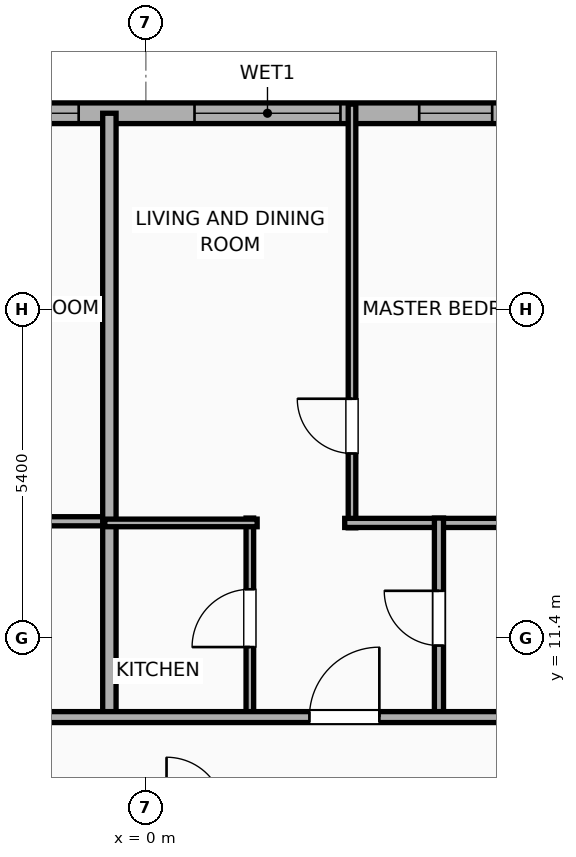
"""IFC4 building model, lengths in metres.
Left out: names, types, materials, properties, quantities, classifications, styles, units other than length and angle.
Written with IfcOpenShell. Run it as: python <this file> out.ifc"""

import sys

from ifc_helpers import new_model, si_unit, direction, frame, frame_2d, origin, place, context, subcontext, project, spatial, rectangle, extrude, element, fill, save


model = new_model("IFC4")
c1 = context("Model", 3, precision=1e-05, world=origin(), true_north=direction((0.0, 1.0)))
c2 = subcontext(c1, "Body", "Model", "MODEL_VIEW")
j1 = project(units=[si_unit("LENGTHUNIT", "METRE"), si_unit("PLANEANGLEUNIT", "RADIAN")], contexts=[c1])
p1 = place(None, origin())
s1 = spatial("IfcSite", under=j1, at=p1, CompositionType="ELEMENT")
p2 = place(p1, origin())
s2 = spatial("IfcBuilding", under=s1, at=p2, CompositionType="ELEMENT")
p3 = place(p2, frame((0.0, 0.0, 235.3)))
s3 = spatial("IfcBuildingStorey", under=s2, at=p3, CompositionType="ELEMENT", Elevation=235.3)
p4 = place(p3, frame((-22.783, 20.03, 0.0), z_axis=(0.0, 0.0, 1.0), x_axis=(1.0, 0.0, 0.0)))
e1 = element("IfcWall", 1, at=p4, inside=s3, PredefinedType="ELEMENTEDWALL", context=c2, shape_type="SweptSolid", body=[
    extrude(rectangle(XDim=49.566, YDim=0.34, at=frame_2d((24.783, 0.0))), origin(), (0.0, 0.0, 1.0), 3.65),
])
p5 = place(p4, frame((23.583, 0.0, 0.75)))
e2 = element("IfcOpeningElement", 2, at=p5, cuts=e1, PredefinedType="OPENING", context=c2, shape_type="SweptSolid", body=[
    extrude(rectangle(XDim=2.4, YDim=2.1, at=frame_2d((1.2, 1.05))), frame((0.0, 0.18, 0.0), z_axis=(0.0, -1.0, 0.0), x_axis=(1.0, 0.0, 0.0)), (0.0, 0.0, 1.0), 0.36),
])
p6 = place(p4, frame((40.956, 0.0, 0.75)))
e3 = element("IfcOpeningElement", 3, at=p6, cuts=e1, PredefinedType="OPENING", context=c2, shape_type="SweptSolid", body=[
    extrude(rectangle(XDim=2.4, YDim=2.1, at=frame_2d((1.2, 1.05))), frame((0.0, 0.18, 0.0), z_axis=(0.0, -1.0, 0.0), x_axis=(1.0, 0.0, 0.0)), (0.0, 0.0, 1.0), 0.36),
])
p7 = place(p4, frame((5.078, 0.0, 0.75)))
e4 = element("IfcOpeningElement", 4, at=p7, cuts=e1, PredefinedType="OPENING", context=c2, shape_type="SweptSolid", body=[
    extrude(rectangle(XDim=1.2, YDim=2.05, at=frame_2d((0.6, 1.025))), frame((0.0, 0.18, 0.0), z_axis=(0.0, -1.0, 0.0), x_axis=(1.0, 0.0, 0.0)), (0.0, 0.0, 1.0), 0.36),
])
p8 = place(p4, frame((8.058, 0.0, 0.75)))
e5 = element("IfcOpeningElement", 5, at=p8, cuts=e1, PredefinedType="OPENING", context=c2, shape_type="SweptSolid", body=[
    extrude(rectangle(XDim=1.2, YDim=2.05, at=frame_2d((0.6, 1.025))), frame((0.0, 0.18, 0.0), z_axis=(0.0, -1.0, 0.0), x_axis=(1.0, 0.0, 0.0)), (0.0, 0.0, 1.0), 0.36),
])
p9 = place(p4, frame((12.478, 0.0, 0.75)))
e6 = element("IfcOpeningElement", 6, at=p9, cuts=e1, PredefinedType="OPENING", context=c2, shape_type="SweptSolid", body=[
    extrude(rectangle(XDim=1.2, YDim=2.05, at=frame_2d((0.6, 1.025))), frame((0.0, 0.18, 0.0), z_axis=(0.0, -1.0, 0.0), x_axis=(1.0, 0.0, 0.0)), (0.0, 0.0, 1.0), 0.36),
])
p10 = place(p4, frame((16.178, 0.0, 0.75)))
e7 = element("IfcOpeningElement", 7, at=p10, cuts=e1, PredefinedType="OPENING", context=c2, shape_type="SweptSolid", body=[
    extrude(rectangle(XDim=1.2, YDim=2.05, at=frame_2d((0.6, 1.025))), frame((0.0, 0.18, 0.0), z_axis=(0.0, -1.0, 0.0), x_axis=(1.0, 0.0, 0.0)), (0.0, 0.0, 1.0), 0.36),
])
p11 = place(p4, frame((20.478, 0.0, 0.75)))
e8 = element("IfcOpeningElement", 8, at=p11, cuts=e1, PredefinedType="OPENING", context=c2, shape_type="SweptSolid", body=[
    extrude(rectangle(XDim=1.2, YDim=2.05, at=frame_2d((0.6, 1.025))), frame((0.0, 0.18, 0.0), z_axis=(0.0, -1.0, 0.0), x_axis=(1.0, 0.0, 0.0)), (0.0, 0.0, 1.0), 0.36),
])
p12 = place(p4, frame((27.278, 0.0, 0.75)))
e9 = element("IfcOpeningElement", 9, at=p12, cuts=e1, PredefinedType="OPENING", context=c2, shape_type="SweptSolid", body=[
    extrude(rectangle(XDim=1.2, YDim=2.05, at=frame_2d((0.6, 1.025))), frame((0.0, 0.18, 0.0), z_axis=(0.0, -1.0, 0.0), x_axis=(1.0, 0.0, 0.0)), (0.0, 0.0, 1.0), 0.36),
])
p13 = place(p4, frame((30.978, 0.0, 0.75)))
e10 = element("IfcOpeningElement", 10, at=p13, cuts=e1, PredefinedType="OPENING", context=c2, shape_type="SweptSolid", body=[
    extrude(rectangle(XDim=1.2, YDim=2.05, at=frame_2d((0.6, 1.025))), frame((0.0, 0.18, 0.0), z_axis=(0.0, -1.0, 0.0), x_axis=(1.0, 0.0, 0.0)), (0.0, 0.0, 1.0), 0.36),
])
p14 = place(p4, frame((34.678, 0.0, 0.75)))
e11 = element("IfcOpeningElement", 11, at=p14, cuts=e1, PredefinedType="OPENING", context=c2, shape_type="SweptSolid", body=[
    extrude(rectangle(XDim=1.2, YDim=2.05, at=frame_2d((0.6, 1.025))), frame((0.0, 0.18, 0.0), z_axis=(0.0, -1.0, 0.0), x_axis=(1.0, 0.0, 0.0)), (0.0, 0.0, 1.0), 0.36),
])
p15 = place(p4, frame((37.798, 0.0, 0.75)))
e12 = element("IfcOpeningElement", 12, at=p15, cuts=e1, PredefinedType="OPENING", context=c2, shape_type="SweptSolid", body=[
    extrude(rectangle(XDim=1.2, YDim=2.05, at=frame_2d((0.6, 1.025))), frame((0.0, 0.18, 0.0), z_axis=(0.0, -1.0, 0.0), x_axis=(1.0, 0.0, 0.0)), (0.0, 0.0, 1.0), 0.36),
])
p16 = place(p4, frame((45.83, 0.0, 0.75)))
e13 = element("IfcOpeningElement", 13, at=p16, cuts=e1, PredefinedType="OPENING", context=c2, shape_type="SweptSolid", body=[
    extrude(rectangle(XDim=1.2, YDim=2.05, at=frame_2d((0.6, 1.025))), frame((0.0, 0.18, 0.0), z_axis=(0.0, -1.0, 0.0), x_axis=(1.0, 0.0, 0.0)), (0.0, 0.0, 1.0), 0.36),
])
p17 = place(p3, frame((-4.13, 13.32, 0.0), z_axis=(0.0, 0.0, 1.0), x_axis=(1.0, 0.0, 0.0)))
e14 = element("IfcWall", 14, at=p17, inside=s3, PredefinedType="PLUMBINGWALL", context=c2, shape_type="SweptSolid", body=[
    extrude(rectangle(XDim=3.605, YDim=0.15, at=frame_2d((1.802, 0.0))), origin(), (0.0, 0.0, 1.0), 3.65),
])
p18 = place(p3, frame((-0.6, 10.02, 0.0), z_axis=(0.0, 0.0, 1.0), x_axis=(0.0, 1.0, 0.0)))
e15 = element("IfcWall", 15, at=p18, inside=s3, PredefinedType="PARTITIONING", context=c2, shape_type="SweptSolid", body=[
    extrude(rectangle(XDim=10.01, YDim=0.22, at=frame_2d((5.005, 0.0))), origin(), (0.0, 0.0, 1.0), 3.65),
])
p19 = place(p3, frame((3.39, 13.213, 0.0), z_axis=(0.0, 0.0, 1.0), x_axis=(0.0, 1.0, 0.0)))
e16 = element("IfcWall", 16, at=p19, inside=s3, PredefinedType="PARTITIONING", context=c2, shape_type="SweptSolid", body=[
    extrude(rectangle(XDim=6.967, YDim=0.125, at=frame_2d((3.483, 0.0))), origin(), (0.0, 0.0, 1.0), 3.65),
])
p20 = place(p19, frame((1.222, 0.0, 0.0)))
e17 = element("IfcOpeningElement", 17, at=p20, cuts=e16, PredefinedType="OPENING", context=c2, shape_type="SweptSolid", body=[
    extrude(rectangle(XDim=0.9, YDim=2.05, at=frame_2d((0.45, 1.025))), frame((0.0, 0.073, 0.0), z_axis=(0.0, -1.0, 0.0), x_axis=(1.0, 0.0, 0.0)), (0.0, 0.0, 1.0), 0.145),
])
p21 = place(p3, frame((3.27, 13.293, 0.0), z_axis=(0.0, 0.0, 1.0), x_axis=(1.0, 0.0, 0.0)))
e18 = element("IfcWall", 18, at=p21, inside=s3, PredefinedType="PLUMBINGWALL", context=c2, shape_type="SweptSolid", body=[
    extrude(rectangle(XDim=3.79, YDim=0.15, at=frame_2d((1.895, 0.0))), origin(), (0.0, 0.0, 1.0), 3.65),
])
p22 = place(p3, frame((1.71, 10.08, 0.0), z_axis=(0.0, 0.0, 1.0), x_axis=(0.0, 1.0, 0.0)))
e19 = element("IfcWall", 19, at=p22, inside=s3, PredefinedType="PARTITIONING", context=c2, shape_type="SweptSolid", body=[
    extrude(rectangle(XDim=3.293, YDim=0.125, at=frame_2d((1.646, 0.0))), origin(), (0.0, 0.0, 1.0), 3.65),
])
p23 = place(p22, frame((1.171, 0.0, 0.0)))
e20 = element("IfcOpeningElement", 20, at=p23, cuts=e19, PredefinedType="OPENING", context=c2, shape_type="SweptSolid", body=[
    extrude(rectangle(XDim=0.95, YDim=2.05, at=frame_2d((0.475, 1.025))), frame((0.0, 0.073, 0.0), z_axis=(0.0, -1.0, 0.0), x_axis=(1.0, 0.0, 0.0)), (0.0, 0.0, 1.0), 0.145),
])
p24 = place(p3, frame((-0.675, 13.293, 0.0), z_axis=(0.0, 0.0, 1.0), x_axis=(1.0, 0.0, 0.0)))
e21 = element("IfcWall", 21, at=p24, inside=s3, PredefinedType="PARTITIONING", context=c2, shape_type="SweptSolid", body=[
    extrude(rectangle(XDim=2.505, YDim=0.125, at=frame_2d((1.252, 0.0))), origin(), (0.0, 0.0, 1.0), 3.65),
])
p25 = place(p3, frame((4.82, 10.08, 0.0), z_axis=(0.0, 0.0, 1.0), x_axis=(0.0, 1.0, 0.0)))
e22 = element("IfcWall", 22, at=p25, inside=s3, PredefinedType="PLUMBINGWALL", context=c2, shape_type="SweptSolid", body=[
    extrude(rectangle(XDim=3.293, YDim=0.15, at=frame_2d((1.646, 0.0))), origin(), (0.0, 0.0, 1.0), 3.09),
])
p26 = place(p25, frame((1.197, 0.0, 0.0)))
e23 = element("IfcOpeningElement", 23, at=p26, cuts=e22, PredefinedType="OPENING", context=c2, shape_type="SweptSolid", body=[
    extrude(rectangle(XDim=0.9, YDim=2.05, at=frame_2d((0.45, 1.025))), frame((0.0, 0.085, 0.0), z_axis=(0.0, -1.0, 0.0), x_axis=(1.0, 0.0, 0.0)), (0.0, 0.0, 1.0), 0.17),
])
p27 = place(p3, frame((-26.23, 10.1, 0.0), z_axis=(0.0, 0.0, 1.0), x_axis=(1.0, 0.0, 0.0)))
e24 = element("IfcWall", 24, at=p27, inside=s3, PredefinedType="PARTITIONING", context=c2, shape_type="SweptSolid", body=[
    extrude(rectangle(XDim=56.46, YDim=0.18, at=frame_2d((28.23, 0.0))), origin(), (0.0, 0.0, 1.0), 3.65),
])
p28 = place(p27, frame((5.302, 0.0, 0.0)))
e25 = element("IfcOpeningElement", 25, at=p28, cuts=e24, PredefinedType="OPENING", context=c2, shape_type="SweptSolid", body=[
    extrude(rectangle(XDim=1.15, YDim=2.05, at=frame_2d((0.575, 1.025))), frame((0.0, 0.1, 0.0), z_axis=(0.0, -1.0, 0.0), x_axis=(1.0, 0.0, 0.0)), (0.0, 0.0, 1.0), 0.2),
])
p29 = place(p27, frame((14.122, 0.0, 0.0)))
e26 = element("IfcOpeningElement", 26, at=p29, cuts=e24, PredefinedType="OPENING", context=c2, shape_type="SweptSolid", body=[
    extrude(rectangle(XDim=1.15, YDim=2.05, at=frame_2d((0.575, 1.025))), frame((0.0, 0.1, 0.0), z_axis=(0.0, -1.0, 0.0), x_axis=(1.0, 0.0, 0.0)), (0.0, 0.0, 1.0), 0.2),
])
p30 = place(p27, frame((21.518, 0.0, 0.0)))
e27 = element("IfcOpeningElement", 27, at=p30, cuts=e24, PredefinedType="OPENING", context=c2, shape_type="SweptSolid", body=[
    extrude(rectangle(XDim=1.15, YDim=2.05, at=frame_2d((0.575, 1.025))), frame((0.0, 0.1, 0.0), z_axis=(0.0, -1.0, 0.0), x_axis=(1.0, 0.0, 0.0)), (0.0, 0.0, 1.0), 0.2),
])
p31 = place(p27, frame((28.92, 0.0, 0.0)))
e28 = element("IfcOpeningElement", 28, at=p31, cuts=e24, PredefinedType="OPENING", context=c2, shape_type="SweptSolid", body=[
    extrude(rectangle(XDim=1.15, YDim=2.05, at=frame_2d((0.575, 1.025))), frame((0.0, 0.1, 0.0), z_axis=(0.0, -1.0, 0.0), x_axis=(1.0, 0.0, 0.0)), (0.0, 0.0, 1.0), 0.2),
])
p32 = place(p27, frame((36.322, 0.0, 0.0)))
e29 = element("IfcOpeningElement", 29, at=p32, cuts=e24, PredefinedType="OPENING", context=c2, shape_type="SweptSolid", body=[
    extrude(rectangle(XDim=1.15, YDim=2.05, at=frame_2d((0.575, 1.025))), frame((0.0, 0.1, 0.0), z_axis=(0.0, -1.0, 0.0), x_axis=(1.0, 0.0, 0.0)), (0.0, 0.0, 1.0), 0.2),
])
p33 = place(p27, frame((43.622, 0.0, 0.0)))
e30 = element("IfcOpeningElement", 30, at=p33, cuts=e24, PredefinedType="OPENING", context=c2, shape_type="SweptSolid", body=[
    extrude(rectangle(XDim=1.15, YDim=2.05, at=frame_2d((0.575, 1.025))), frame((0.0, 0.1, 0.0), z_axis=(0.0, -1.0, 0.0), x_axis=(1.0, 0.0, 0.0)), (0.0, 0.0, 1.0), 0.2),
])
p34 = place(p27, frame((51.781, 0.0, 0.0)))
e31 = element("IfcOpeningElement", 31, at=p34, cuts=e24, PredefinedType="OPENING", context=c2, shape_type="SweptSolid", body=[
    extrude(rectangle(XDim=1.15, YDim=2.05, at=frame_2d((0.575, 1.025))), frame((0.0, 0.1, 0.0), z_axis=(0.0, -1.0, 0.0), x_axis=(1.0, 0.0, 0.0)), (0.0, 0.0, 1.0), 0.2),
])
p35 = place(p5, origin())
e32 = element("IfcWindow", 32, at=p35, inside=s3, PartitioningType="SINGLE_PANEL", PredefinedType="WINDOW", context=c2, shape_type="SweptSolid", body=[
    extrude(rectangle(XDim=2.4, YDim=2.1, at=frame_2d((1.2, 1.05))), frame((0.0, 0.03, 0.0), z_axis=(0.0, -1.0, 0.0), x_axis=(1.0, 0.0, 0.0)), (0.0, 0.0, 1.0), 0.06),
])
fill(e2, e32)
p36 = place(p11, origin())
e33 = element("IfcWindow", 33, at=p36, inside=s3, PartitioningType="SINGLE_PANEL", PredefinedType="WINDOW", context=c2, shape_type="SweptSolid", body=[
    extrude(rectangle(XDim=1.2, YDim=2.05, at=frame_2d((0.6, 1.025))), frame((0.0, 0.03, 0.0), z_axis=(0.0, -1.0, 0.0), x_axis=(1.0, 0.0, 0.0)), (0.0, 0.0, 1.0), 0.06),
])
fill(e8, e33)
p37 = place(p12, origin())
e34 = element("IfcWindow", 34, at=p37, inside=s3, PartitioningType="SINGLE_PANEL", PredefinedType="WINDOW", context=c2, shape_type="SweptSolid", body=[
    extrude(rectangle(XDim=1.2, YDim=2.05, at=frame_2d((0.6, 1.025))), frame((0.0, 0.03, 0.0), z_axis=(0.0, -1.0, 0.0), x_axis=(1.0, 0.0, 0.0)), (0.0, 0.0, 1.0), 0.06),
])
fill(e9, e34)
p38 = place(p20, origin())
e35 = element("IfcDoor", 35, at=p38, inside=s3, OperationType="SINGLE_SWING_RIGHT", PredefinedType="DOOR", context=c2, shape_type="SweptSolid", body=[
    extrude(rectangle(XDim=0.9, YDim=2.05, at=frame_2d((0.45, 1.025))), frame((0.0, 0.025, 0.0), z_axis=(0.0, -1.0, 0.0), x_axis=(1.0, 0.0, 0.0)), (0.0, 0.0, 1.0), 0.05),
])
fill(e17, e35)
p39 = place(p23, origin())
e36 = element("IfcDoor", 36, at=p39, inside=s3, OperationType="SINGLE_SWING_LEFT", PredefinedType="DOOR", context=c2, shape_type="SweptSolid", body=[
    extrude(rectangle(XDim=0.95, YDim=2.05, at=frame_2d((0.475, 1.025))), frame((0.0, 0.025, 0.0), z_axis=(0.0, -1.0, 0.0), x_axis=(1.0, 0.0, 0.0)), (0.0, 0.0, 1.0), 0.05),
])
fill(e20, e36)
p40 = place(p26, origin())
e37 = element("IfcDoor", 37, at=p40, inside=s3, OperationType="SINGLE_SWING_RIGHT", PredefinedType="DOOR", context=c2, shape_type="SweptSolid", body=[
    extrude(rectangle(XDim=0.9, YDim=2.05, at=frame_2d((0.45, 1.025))), frame((0.0, 0.025, 0.0), z_axis=(0.0, -1.0, 0.0), x_axis=(1.0, 0.0, 0.0)), (0.0, 0.0, 1.0), 0.05),
])
fill(e23, e37)
p41 = place(p31, origin())
e38 = element("IfcDoor", 38, at=p41, inside=s3, OperationType="SINGLE_SWING_RIGHT", PredefinedType="DOOR", context=c2, shape_type="SweptSolid", body=[
    extrude(rectangle(XDim=1.15, YDim=2.05, at=frame_2d((0.575, 1.025))), frame((0.0, 0.025, 0.0), z_axis=(0.0, -1.0, 0.0), x_axis=(1.0, 0.0, 0.0)), (0.0, 0.0, 1.0), 0.05),
])
fill(e28, e38)
save(model, sys.argv[1])
